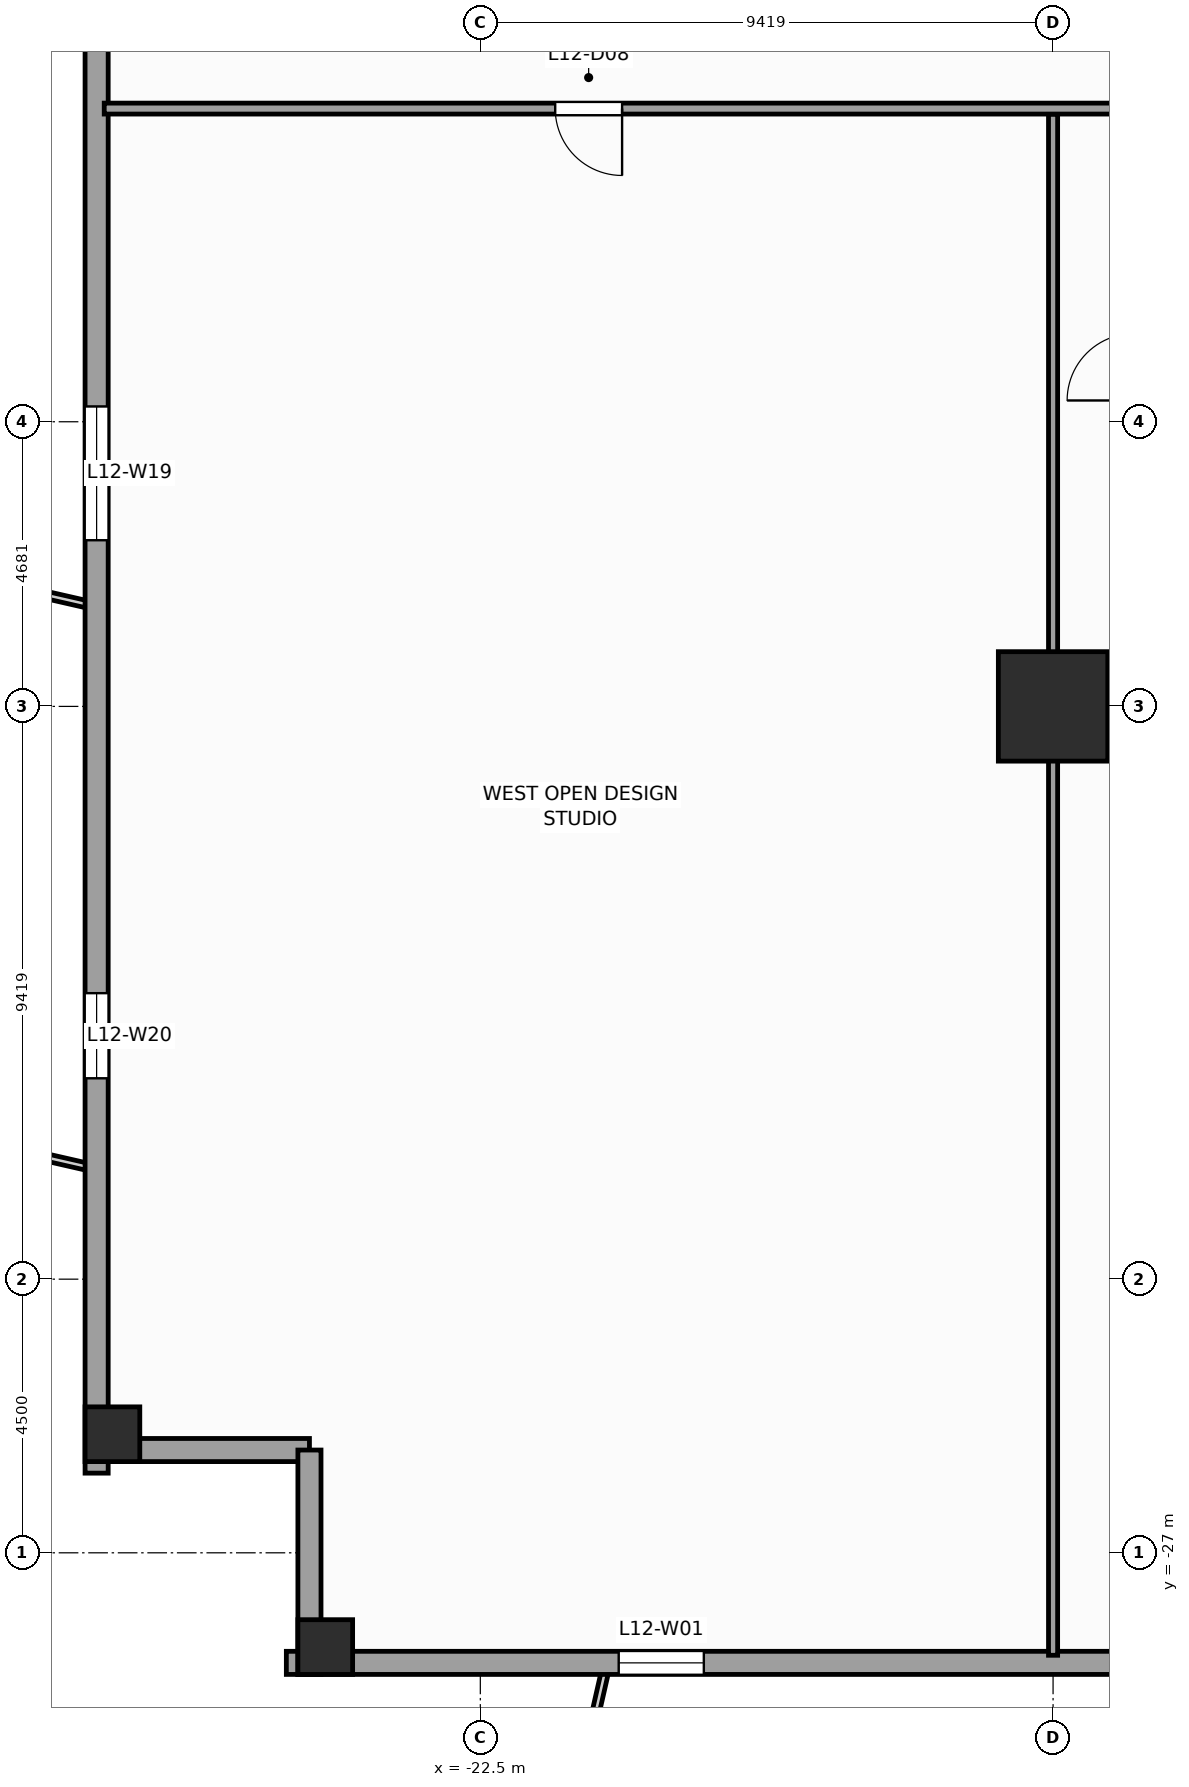
"""IFC4 building model, lengths in metres.
Left out: names, types, materials, properties, quantities, classifications, styles, units other than length and angle.
Written with IfcOpenShell. Run it as: python <this file> out.ifc"""

import sys

from ifc_helpers import new_model, si_unit, direction, frame, frame_2d, origin, origin_2d, place, context, subcontext, project, spatial, rectangle, extrude, source, transform, mapped, element, fill, save


model = new_model("IFC4")
c1 = context("Model", 3, precision=1e-05, world=origin(), true_north=direction((0.0, 1.0)))
c2 = subcontext(c1, "Body", "Model", "MODEL_VIEW")
j1 = project(units=[si_unit("LENGTHUNIT", "METRE"), si_unit("PLANEANGLEUNIT", "RADIAN")], contexts=[c1])
p1 = place(None, origin())
s1 = spatial("IfcSite", under=j1, at=p1, CompositionType="ELEMENT")
p2 = place(p1, origin())
s2 = spatial("IfcBuilding", under=s1, at=p2, CompositionType="ELEMENT")
p3 = place(p2, frame((0.0, 0.0, 54.0)))
s3 = spatial("IfcBuildingStorey", under=s2, at=p3, CompositionType="ELEMENT", Elevation=54.0)
m1 = source(origin(), c2, "Body", "SweptSolid", [
    extrude(rectangle(XDim=1.8, YDim=1.8, at=origin_2d()), origin(), (0.0, 0.0, 1.0), 4.0),
])
p4 = place(p3, frame((-13.081, -13.081, 0.0), z_axis=(0.0, 0.0, 1.0), x_axis=(1.0, 0.0, 0.0)))
e1 = element("IfcColumn", 1, at=p4, inside=s3, PredefinedType="COLUMN", context=c2, shape_type="MappedRepresentation", body=[
    mapped(m1, transform((0.0, 0.0, 0.0), scale=1.0)),
])
m2 = source(origin(), c2, "Body", "SweptSolid", [
    extrude(rectangle(XDim=0.9, YDim=0.9, at=origin_2d()), origin(), (0.0, 0.0, 1.0), 4.0),
])
for number, where, z_axis, x_axis in (
    (2, (-25.05, -28.55, 0.0), (0.0, 0.0, 1.0), (1.0, 0.0, 0.0)),
    (3, (-28.55, -25.05, 0.0), (0.0, 0.0, 1.0), (1.0, 0.0, 0.0)),
):
    element("IfcColumn", number, at=place(p3, frame(where, z_axis=z_axis, x_axis=x_axis)), inside=s3, PredefinedType="COLUMN", context=c2, shape_type="MappedRepresentation", body=[
        mapped(m2, transform((0.0, 0.0, 0.0), scale=1.0)),
    ])
p5 = place(p3, frame((-25.69, -28.81, 0.0), z_axis=(0.0, 0.0, 1.0), x_axis=(1.0, 0.0, 0.0)))
e4 = element("IfcWall", 4, at=p5, inside=s3, PredefinedType="STANDARD", context=c2, shape_type="SweptSolid", body=[
    extrude(rectangle(XDim=51.38, YDim=0.38, at=frame_2d((25.69, 0.0))), origin(), (0.0, 0.0, 1.0), 3.12),
])
p6 = place(p5, frame((18.715, 0.0, 0.0)))
e5 = element("IfcOpeningElement", 5, at=p6, cuts=e4, PredefinedType="OPENING", context=c2, shape_type="SweptSolid", body=[
    extrude(rectangle(XDim=1.05, YDim=2.25, at=frame_2d((0.525, 1.125))), frame((0.0, 0.2, 0.0), z_axis=(0.0, -1.0, 0.0), x_axis=(1.0, 0.0, 0.0)), (0.0, 0.0, 1.0), 0.4),
])
p7 = place(p5, frame((5.466, 0.0, 0.49)))
e6 = element("IfcOpeningElement", 6, at=p7, cuts=e4, PredefinedType="OPENING", context=c2, shape_type="SweptSolid", body=[
    extrude(rectangle(XDim=1.4, YDim=2.4, at=frame_2d((0.7, 1.2))), frame((0.0, 0.2, 0.0), z_axis=(0.0, -1.0, 0.0), x_axis=(1.0, 0.0, 0.0)), (0.0, 0.0, 1.0), 0.4),
])
p8 = place(p5, frame((13.8, 0.0, 0.49)))
e7 = element("IfcOpeningElement", 7, at=p8, cuts=e4, PredefinedType="OPENING", context=c2, shape_type="SweptSolid", body=[
    extrude(rectangle(XDim=2.2, YDim=2.4, at=frame_2d((1.1, 1.2))), frame((0.0, 0.2, 0.0), z_axis=(0.0, -1.0, 0.0), x_axis=(1.0, 0.0, 0.0)), (0.0, 0.0, 1.0), 0.4),
])
p9 = place(p5, frame((22.062, 0.0, 0.49)))
e8 = element("IfcOpeningElement", 8, at=p9, cuts=e4, PredefinedType="OPENING", context=c2, shape_type="SweptSolid", body=[
    extrude(rectangle(XDim=2.2, YDim=2.4, at=frame_2d((1.1, 1.2))), frame((0.0, 0.2, 0.0), z_axis=(0.0, -1.0, 0.0), x_axis=(1.0, 0.0, 0.0)), (0.0, 0.0, 1.0), 0.4),
])
p10 = place(p5, frame((33.838, 0.0, 0.49)))
e9 = element("IfcOpeningElement", 9, at=p10, cuts=e4, PredefinedType="OPENING", context=c2, shape_type="SweptSolid", body=[
    extrude(rectangle(XDim=2.2, YDim=2.4, at=frame_2d((1.1, 1.2))), frame((0.0, 0.2, 0.0), z_axis=(0.0, -1.0, 0.0), x_axis=(1.0, 0.0, 0.0)), (0.0, 0.0, 1.0), 0.4),
])
p11 = place(p5, frame((43.487, 0.0, 0.49)))
e10 = element("IfcOpeningElement", 10, at=p11, cuts=e4, PredefinedType="OPENING", context=c2, shape_type="SweptSolid", body=[
    extrude(rectangle(XDim=1.4, YDim=2.4, at=frame_2d((0.7, 1.2))), frame((0.0, 0.2, 0.0), z_axis=(0.0, -1.0, 0.0), x_axis=(1.0, 0.0, 0.0)), (0.0, 0.0, 1.0), 0.4),
])
p12 = place(p3, frame((-28.81, 25.69, 0.0), z_axis=(0.0, 0.0, 1.0), x_axis=(0.0, -1.0, 0.0)))
e11 = element("IfcWall", 11, at=p12, inside=s3, PredefinedType="STANDARD", context=c2, shape_type="SweptSolid", body=[
    extrude(rectangle(XDim=51.38, YDim=0.38, at=frame_2d((25.69, 0.0))), origin(), (0.0, 0.0, 1.0), 3.12),
])
p13 = place(p12, frame((5.466, 0.0, 0.49)))
e12 = element("IfcOpeningElement", 12, at=p13, cuts=e11, PredefinedType="OPENING", context=c2, shape_type="SweptSolid", body=[
    extrude(rectangle(XDim=1.4, YDim=2.4, at=frame_2d((0.7, 1.2))), frame((0.0, 0.2, 0.0), z_axis=(0.0, -1.0, 0.0), x_axis=(1.0, 0.0, 0.0)), (0.0, 0.0, 1.0), 0.4),
])
p14 = place(p12, frame((13.8, 0.0, 0.49)))
e13 = element("IfcOpeningElement", 13, at=p14, cuts=e11, PredefinedType="OPENING", context=c2, shape_type="SweptSolid", body=[
    extrude(rectangle(XDim=2.2, YDim=2.4, at=frame_2d((1.1, 1.2))), frame((0.0, 0.2, 0.0), z_axis=(0.0, -1.0, 0.0), x_axis=(1.0, 0.0, 0.0)), (0.0, 0.0, 1.0), 0.4),
])
p15 = place(p12, frame((22.062, 0.0, 0.49)))
e14 = element("IfcOpeningElement", 14, at=p15, cuts=e11, PredefinedType="OPENING", context=c2, shape_type="SweptSolid", body=[
    extrude(rectangle(XDim=2.2, YDim=2.4, at=frame_2d((1.1, 1.2))), frame((0.0, 0.2, 0.0), z_axis=(0.0, -1.0, 0.0), x_axis=(1.0, 0.0, 0.0)), (0.0, 0.0, 1.0), 0.4),
])
p16 = place(p12, frame((33.838, 0.0, 0.49)))
e15 = element("IfcOpeningElement", 15, at=p16, cuts=e11, PredefinedType="OPENING", context=c2, shape_type="SweptSolid", body=[
    extrude(rectangle(XDim=2.2, YDim=2.4, at=frame_2d((1.1, 1.2))), frame((0.0, 0.2, 0.0), z_axis=(0.0, -1.0, 0.0), x_axis=(1.0, 0.0, 0.0)), (0.0, 0.0, 1.0), 0.4),
])
p17 = place(p12, frame((43.487, 0.0, 0.49)))
e16 = element("IfcOpeningElement", 16, at=p17, cuts=e11, PredefinedType="OPENING", context=c2, shape_type="SweptSolid", body=[
    extrude(rectangle(XDim=1.4, YDim=2.4, at=frame_2d((0.7, 1.2))), frame((0.0, 0.2, 0.0), z_axis=(0.0, -1.0, 0.0), x_axis=(1.0, 0.0, 0.0)), (0.0, 0.0, 1.0), 0.4),
])
p18 = place(p3, frame((-28.81, -25.31, 0.0), z_axis=(0.0, 0.0, 1.0), x_axis=(1.0, 0.0, 0.0)))
e17 = element("IfcWall", 17, at=p18, inside=s3, PredefinedType="STANDARD", context=c2, shape_type="SweptSolid", body=[
    extrude(rectangle(XDim=3.5, YDim=0.38, at=frame_2d((1.75, 0.0))), origin(), (0.0, 0.0, 1.0), 3.72),
])
p19 = place(p3, frame((-25.31, -25.31, 0.0), z_axis=(0.0, 0.0, 1.0), x_axis=(0.0, -1.0, 0.0)))
e18 = element("IfcWall", 18, at=p19, inside=s3, PredefinedType="STANDARD", context=c2, shape_type="SweptSolid", body=[
    extrude(rectangle(XDim=3.69, YDim=0.38, at=frame_2d((1.845, 0.0))), origin(), (0.0, 0.0, 1.0), 3.72),
])
p20 = place(p3, frame((-28.685, -3.25, 0.0), z_axis=(0.0, 0.0, 1.0), x_axis=(1.0, 0.0, 0.0)))
e19 = element("IfcWall", 19, at=p20, inside=s3, PredefinedType="PARTITIONING", context=c2, shape_type="SweptSolid", body=[
    extrude(rectangle(XDim=16.835, YDim=0.18, at=frame_2d((8.417, 0.0))), origin(), (0.0, 0.0, 1.0), 3.39),
])
p21 = place(p20, frame((7.417, 0.0, 0.0)))
e20 = element("IfcOpeningElement", 20, at=p21, cuts=e19, PredefinedType="OPENING", context=c2, shape_type="SweptSolid", body=[
    extrude(rectangle(XDim=1.1, YDim=2.2, at=frame_2d((0.55, 1.1))), frame((0.0, 0.1, 0.0), z_axis=(0.0, -1.0, 0.0), x_axis=(1.0, 0.0, 0.0)), (0.0, 0.0, 1.0), 0.2),
])
p22 = place(p3, frame((-13.081, -28.685, 0.0), z_axis=(0.0, 0.0, 1.0), x_axis=(0.0, 1.0, 0.0)))
e21 = element("IfcWall", 21, at=p22, inside=s3, PredefinedType="PARTITIONING", context=c2, shape_type="SweptSolid", body=[
    extrude(rectangle(XDim=25.34, YDim=0.15, at=frame_2d((12.67, 0.0))), origin(), (0.0, 0.0, 1.0), 2.712),
])
m3 = source(origin(), c2, "Body", "SweptSolid", [
    extrude(rectangle(XDim=1.4, YDim=2.4, at=frame_2d((0.7, 1.2))), frame((0.0, 0.03, 0.0), z_axis=(0.0, -1.0, 0.0), x_axis=(1.0, 0.0, 0.0)), (0.0, 0.0, 1.0), 0.06),
])
p23 = place(p7, origin())
e22 = element("IfcWindow", 22, at=p23, inside=s3, PartitioningType="SINGLE_PANEL", PredefinedType="WINDOW", context=c2, shape_type="MappedRepresentation", body=[
    mapped(m3, transform((0.0, 0.0, 0.0), scale=1.0)),
])
fill(e6, e22)
m4 = source(origin(), c2, "Body", "SweptSolid", [
    extrude(rectangle(XDim=2.2, YDim=2.4, at=frame_2d((1.1, 1.2))), frame((0.0, 0.03, 0.0), z_axis=(0.0, -1.0, 0.0), x_axis=(1.0, 0.0, 0.0)), (0.0, 0.0, 1.0), 0.06),
])
p24 = place(p16, origin())
e23 = element("IfcWindow", 23, at=p24, inside=s3, PartitioningType="SINGLE_PANEL", PredefinedType="WINDOW", context=c2, shape_type="MappedRepresentation", body=[
    mapped(m4, transform((0.0, 0.0, 0.0), scale=1.0)),
])
fill(e15, e23)
p25 = place(p17, origin())
e24 = element("IfcWindow", 24, at=p25, inside=s3, PartitioningType="SINGLE_PANEL", PredefinedType="WINDOW", context=c2, shape_type="MappedRepresentation", body=[
    mapped(m3, transform((0.0, 0.0, 0.0), scale=1.0)),
])
fill(e16, e24)
m5 = source(origin(), c2, "Body", "SweptSolid", [
    extrude(rectangle(XDim=1.1, YDim=2.2, at=frame_2d((0.55, 1.1))), frame((0.0, 0.025, 0.0), z_axis=(0.0, -1.0, 0.0), x_axis=(1.0, 0.0, 0.0)), (0.0, 0.0, 1.0), 0.05),
])
p26 = place(p21, frame((1.1, 0.0, 0.0), z_axis=(0.0, 0.0, 1.0), x_axis=(-1.0, 0.0, 0.0)))
e25 = element("IfcDoor", 25, at=p26, inside=s3, OperationType="SINGLE_SWING_RIGHT", PredefinedType="DOOR", context=c2, shape_type="MappedRepresentation", body=[
    mapped(m5, transform((0.0, 0.0, 0.0), scale=1.0)),
])
fill(e20, e25)
save(model, sys.argv[1])
